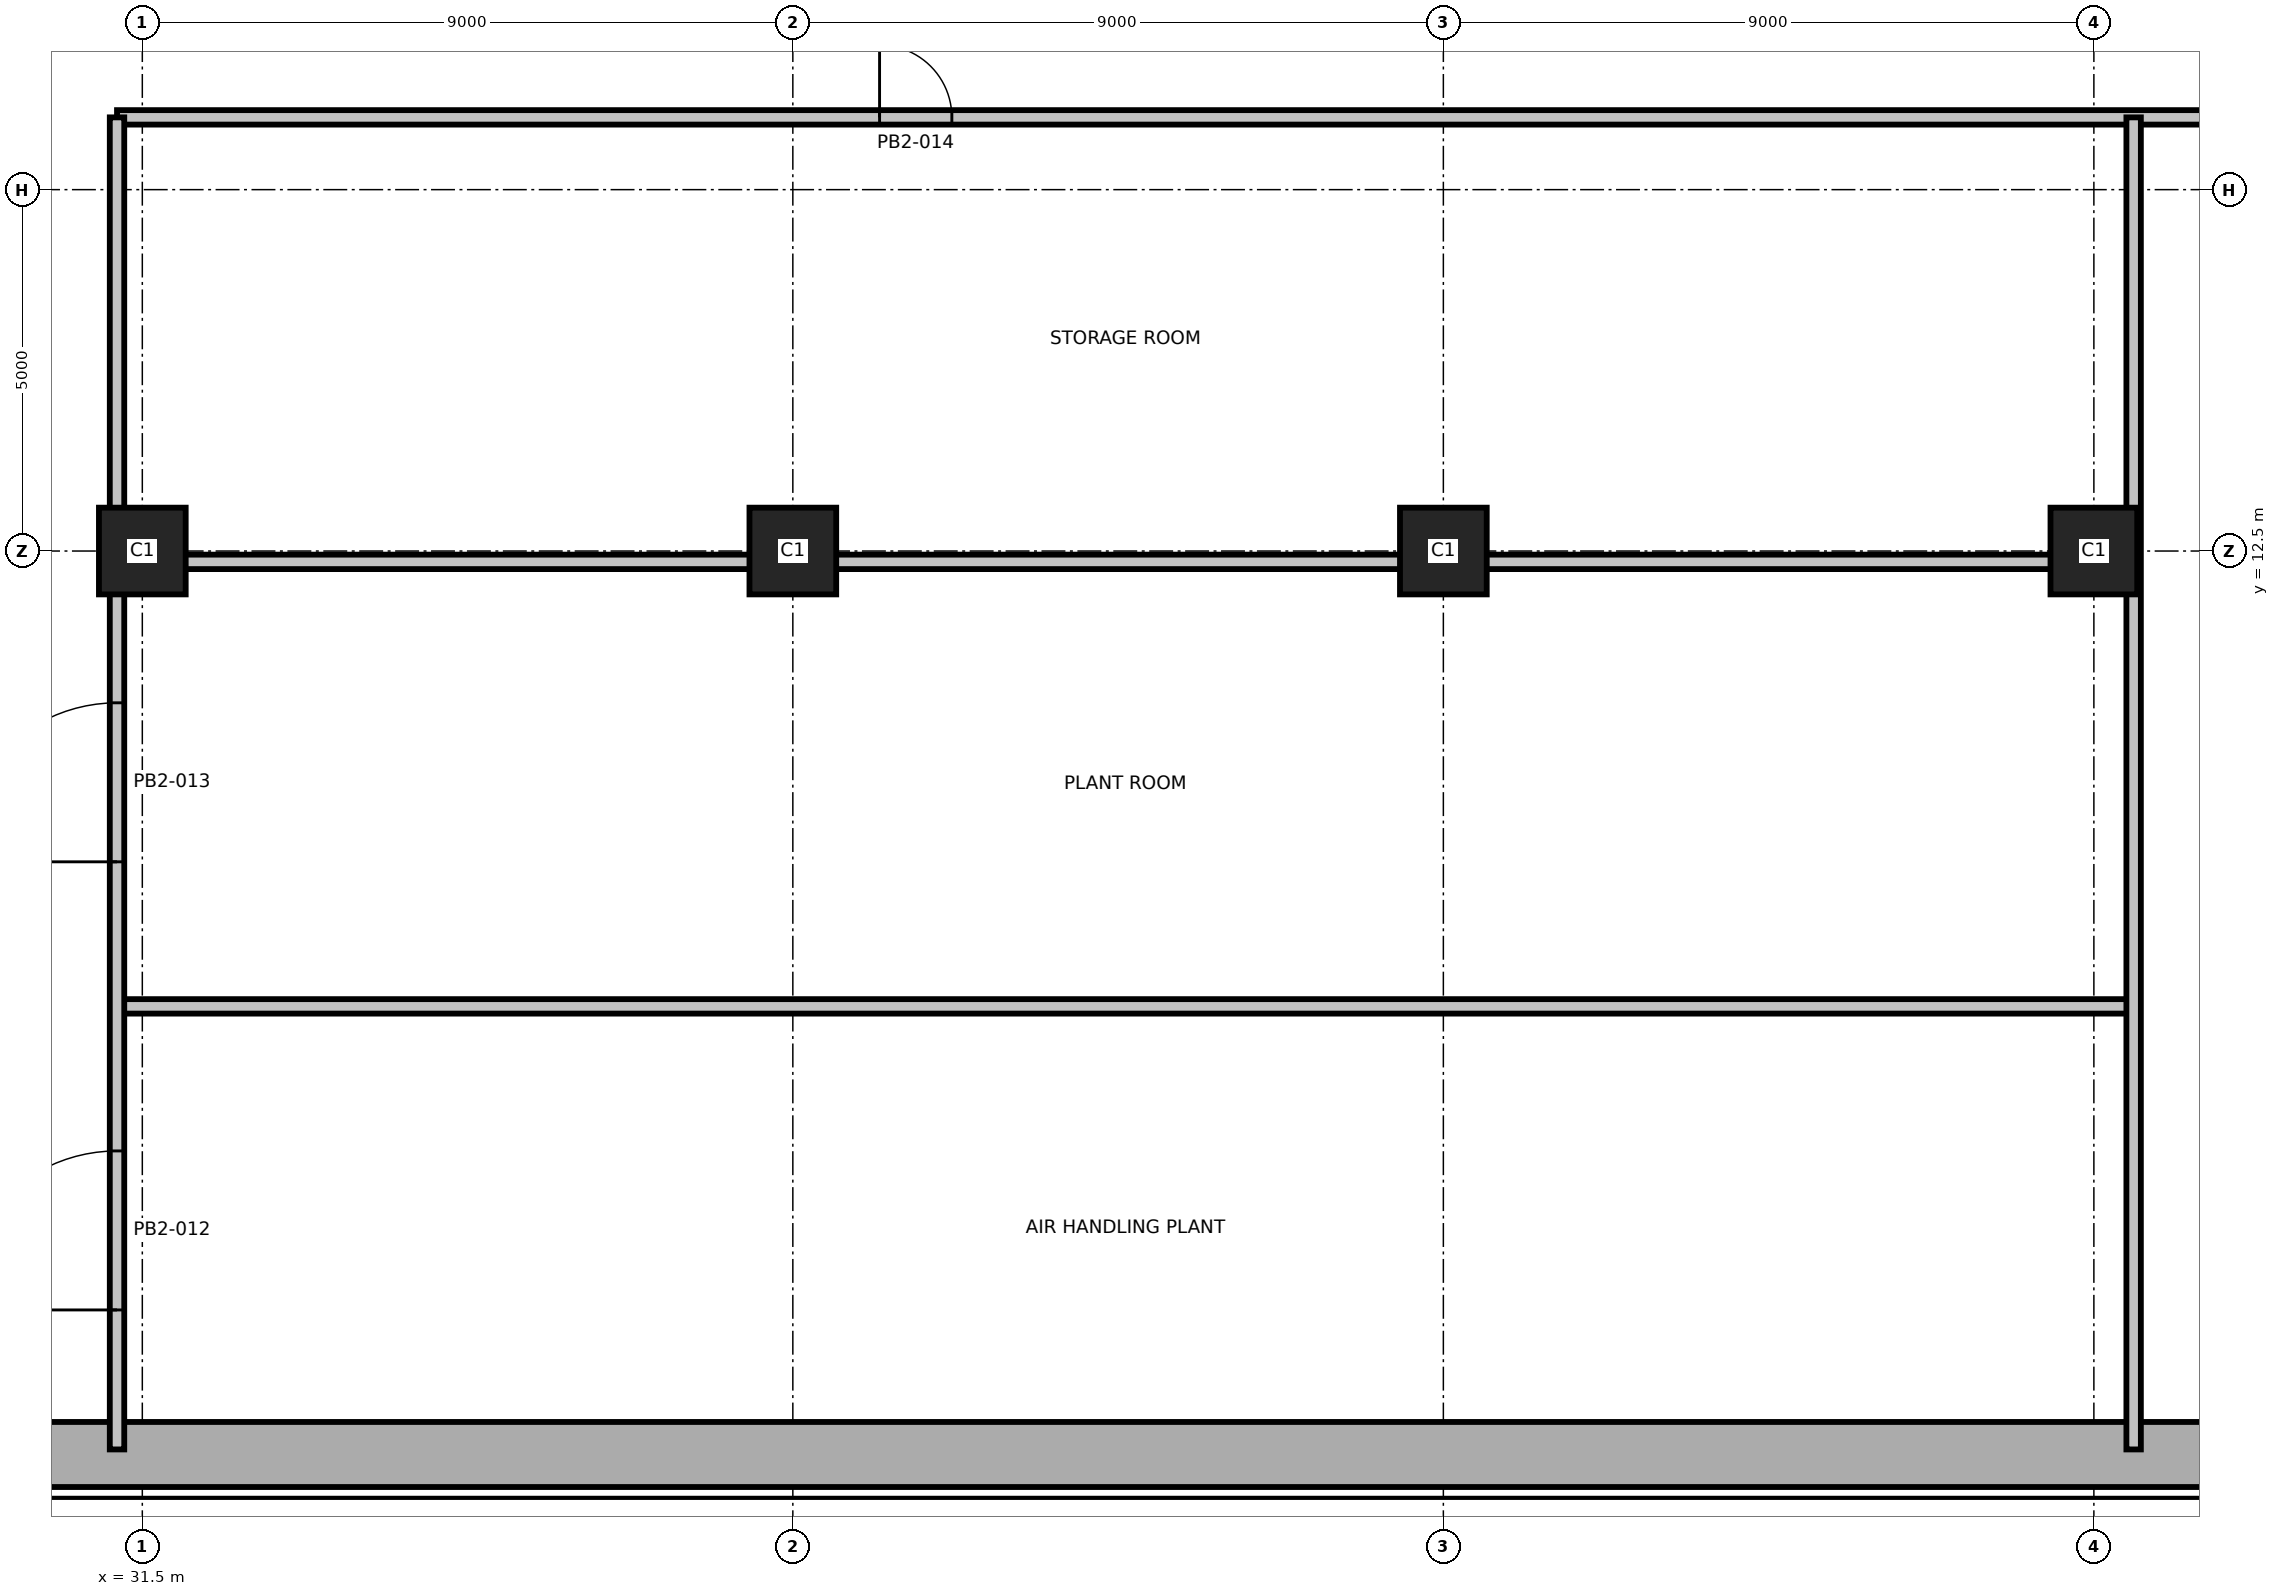
"""IFC4 building model, lengths in metres.
Left out: names, types, materials, properties, quantities, classifications, styles, units other than length and angle.
Written with IfcOpenShell. Run it as: python <this file> out.ifc"""

import sys

from ifc_helpers import new_model, si_unit, direction, frame, frame_2d, origin, origin_2d, place, context, subcontext, project, spatial, rectangle, extrude, element, fill, save


model = new_model("IFC4")
c1 = context("Model", 3, precision=1e-05, world=origin(), true_north=direction((0.0, 1.0)))
c2 = subcontext(c1, "Body", "Model", "MODEL_VIEW")
j1 = project(units=[si_unit("LENGTHUNIT", "METRE"), si_unit("PLANEANGLEUNIT", "RADIAN")], contexts=[c1])
p1 = place(None, origin())
s1 = spatial("IfcSite", under=j1, at=p1, CompositionType="ELEMENT")
p2 = place(p1, origin())
s2 = spatial("IfcBuilding", under=s1, at=p2, CompositionType="ELEMENT")
p3 = place(p2, frame((0.0, 0.0, -9.0)))
s3 = spatial("IfcBuildingStorey", under=s2, at=p3, CompositionType="ELEMENT", Elevation=-9.0)
for number, where, z_axis, x_axis in (
    (1, (31.5, 12.5, 0.0), (0.0, 0.0, 1.0), (1.0, 0.0, 0.0)),
    (2, (40.5, 12.5, 0.0), (0.0, 0.0, 1.0), (1.0, 0.0, 0.0)),
    (3, (49.5, 12.5, 0.0), (0.0, 0.0, 1.0), (1.0, 0.0, 0.0)),
    (4, (58.5, 12.5, 0.0), (0.0, 0.0, 1.0), (1.0, 0.0, 0.0)),
):
    element("IfcColumn", number, at=place(p3, frame(where, z_axis=z_axis, x_axis=x_axis)), inside=s3, PredefinedType="COLUMN", context=c2, shape_type="SweptSolid", body=[
        extrude(rectangle(XDim=1.2, YDim=1.2, at=origin_2d()), origin(), (0.0, 0.0, 1.0), 4.5),
    ])
p4 = place(p3, frame((20.55, 0.0, 0.0), z_axis=(0.0, 0.0, 1.0), x_axis=(1.0, 0.0, 0.0)))
e5 = element("IfcWall", 5, at=p4, inside=s3, PredefinedType="SOLIDWALL", context=c2, shape_type="SweptSolid", body=[
    extrude(rectangle(XDim=84.9, YDim=0.9, at=frame_2d((42.45, 0.0))), origin(), (0.0, 0.0, 1.0), 4.5),
])
p5 = place(p3, frame((31.15, 12.35, 0.0), z_axis=(0.0, 0.0, 1.0), x_axis=(1.0, 0.0, 0.0)))
e6 = element("IfcWall", 6, at=p5, inside=s3, PredefinedType="PARTITIONING", context=c2, shape_type="SweptSolid", body=[
    extrude(rectangle(XDim=27.9, YDim=0.2, at=frame_2d((13.95, 0.0))), origin(), (0.0, 0.0, 1.0), 4.2),
])
p6 = place(p3, frame((31.15, 18.5, 0.0), z_axis=(0.0, 0.0, 1.0), x_axis=(1.0, 0.0, 0.0)))
e7 = element("IfcWall", 7, at=p6, inside=s3, PredefinedType="PARTITIONING", context=c2, shape_type="SweptSolid", body=[
    extrude(rectangle(XDim=30.35, YDim=0.2, at=frame_2d((15.175, 0.0))), origin(), (0.0, 0.0, 1.0), 4.2),
])
p7 = place(p6, frame((10.55, 0.0, 0.0)))
e8 = element("IfcOpeningElement", 8, at=p7, cuts=e7, PredefinedType="OPENING", context=c2, shape_type="SweptSolid", body=[
    extrude(rectangle(XDim=1.0, YDim=2.1, at=frame_2d((0.5, 1.05))), frame((0.0, 0.11, 0.0), z_axis=(0.0, -1.0, 0.0), x_axis=(1.0, 0.0, 0.0)), (0.0, 0.0, 1.0), 0.22),
])
p8 = place(p3, frame((31.15, 6.2, 0.0), z_axis=(0.0, 0.0, 1.0), x_axis=(1.0, 0.0, 0.0)))
e9 = element("IfcWall", 9, at=p8, inside=s3, PredefinedType="PARTITIONING", context=c2, shape_type="SweptSolid", body=[
    extrude(rectangle(XDim=27.9, YDim=0.2, at=frame_2d((13.95, 0.0))), origin(), (0.0, 0.0, 1.0), 4.2),
])
p9 = place(p3, frame((31.15, 0.07, 0.0), z_axis=(0.0, 0.0, 1.0), x_axis=(0.0, 1.0, 0.0)))
e10 = element("IfcWall", 10, at=p9, inside=s3, PredefinedType="PARTITIONING", context=c2, shape_type="SweptSolid", body=[
    extrude(rectangle(XDim=18.43, YDim=0.2, at=frame_2d((9.215, 0.0))), origin(), (0.0, 0.0, 1.0), 4.2),
])
p10 = place(p9, frame((1.93, 0.0, 0.0)))
e11 = element("IfcOpeningElement", 11, at=p10, cuts=e10, PredefinedType="OPENING", context=c2, shape_type="SweptSolid", body=[
    extrude(rectangle(XDim=2.2, YDim=2.4, at=frame_2d((1.1, 1.2))), frame((0.0, 0.11, 0.0), z_axis=(0.0, -1.0, 0.0), x_axis=(1.0, 0.0, 0.0)), (0.0, 0.0, 1.0), 0.22),
])
p11 = place(p9, frame((8.13, 0.0, 0.0)))
e12 = element("IfcOpeningElement", 12, at=p11, cuts=e10, PredefinedType="OPENING", context=c2, shape_type="SweptSolid", body=[
    extrude(rectangle(XDim=2.2, YDim=2.4, at=frame_2d((1.1, 1.2))), frame((0.0, 0.11, 0.0), z_axis=(0.0, -1.0, 0.0), x_axis=(1.0, 0.0, 0.0)), (0.0, 0.0, 1.0), 0.22),
])
p12 = place(p3, frame((59.05, 0.07, 0.0), z_axis=(0.0, 0.0, 1.0), x_axis=(0.0, 1.0, 0.0)))
e13 = element("IfcWall", 13, at=p12, inside=s3, PredefinedType="PARTITIONING", context=c2, shape_type="SweptSolid", body=[
    extrude(rectangle(XDim=18.43, YDim=0.2, at=frame_2d((9.215, 0.0))), origin(), (0.0, 0.0, 1.0), 4.2),
])
p13 = place(p10, origin())
e14 = element("IfcDoor", 14, at=p13, inside=s3, OperationType="SINGLE_SWING_RIGHT", PredefinedType="DOOR", context=c2, shape_type="SweptSolid", body=[
    extrude(rectangle(XDim=2.2, YDim=2.4, at=frame_2d((1.1, 1.2))), frame((0.0, 0.025, 0.0), z_axis=(0.0, -1.0, 0.0), x_axis=(1.0, 0.0, 0.0)), (0.0, 0.0, 1.0), 0.05),
])
fill(e11, e14)
p14 = place(p11, origin())
e15 = element("IfcDoor", 15, at=p14, inside=s3, OperationType="SINGLE_SWING_LEFT", PredefinedType="DOOR", context=c2, shape_type="SweptSolid", body=[
    extrude(rectangle(XDim=2.2, YDim=2.4, at=frame_2d((1.1, 1.2))), frame((0.0, 0.025, 0.0), z_axis=(0.0, -1.0, 0.0), x_axis=(1.0, 0.0, 0.0)), (0.0, 0.0, 1.0), 0.05),
])
fill(e12, e15)
p15 = place(p7, origin())
e16 = element("IfcDoor", 16, at=p15, inside=s3, OperationType="SINGLE_SWING_RIGHT", PredefinedType="DOOR", context=c2, shape_type="SweptSolid", body=[
    extrude(rectangle(XDim=1.0, YDim=2.1, at=frame_2d((0.5, 1.05))), frame((0.0, 0.025, 0.0), z_axis=(0.0, -1.0, 0.0), x_axis=(1.0, 0.0, 0.0)), (0.0, 0.0, 1.0), 0.05),
])
fill(e8, e16)
save(model, sys.argv[1])
